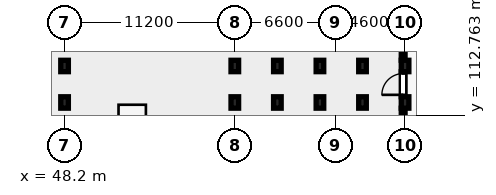
"""IFC4 building model, lengths in metres.
Left out: names, types, materials, properties, quantities, classifications, styles, units other than length and angle.
Written with IfcOpenShell. Run it as: python <this file> out.ifc"""

import sys

from ifc_helpers import new_model, si_unit, direction, frame, frame_2d, origin, origin_2d, place, context, subcontext, project, spatial, rectangle, extrude, element, fill, save


model = new_model("IFC4")
c1 = context("Model", 3, precision=1e-05, world=origin(), true_north=direction((0.0, 1.0)))
c2 = subcontext(c1, "Body", "Model", "MODEL_VIEW")
j1 = project(units=[si_unit("LENGTHUNIT", "METRE"), si_unit("PLANEANGLEUNIT", "RADIAN")], contexts=[c1])
p1 = place(None, origin())
s1 = spatial("IfcSite", under=j1, at=p1, CompositionType="ELEMENT")
p2 = place(p1, origin())
s2 = spatial("IfcBuilding", under=s1, at=p2, CompositionType="ELEMENT")
p3 = place(p2, origin())
s3 = spatial("IfcBuildingStorey", under=s2, at=p3, CompositionType="ELEMENT", Elevation=0.0)
for number, where, z_axis, x_axis in (
    (1, (48.2, 113.6, 0.0), (0.0, 0.0, 1.0), (1.0, 0.0, 0.0)),
    (2, (48.2, 116.0, 0.0), (0.0, 0.0, 1.0), (1.0, 0.0, 0.0)),
    (3, (59.4, 113.6, 0.0), (0.0, 0.0, 1.0), (1.0, 0.0, 0.0)),
    (4, (59.4, 116.0, 0.0), (0.0, 0.0, 1.0), (1.0, 0.0, 0.0)),
    (5, (62.2, 113.6, 0.0), (0.0, 0.0, 1.0), (1.0, 0.0, 0.0)),
    (6, (62.2, 116.0, 0.0), (0.0, 0.0, 1.0), (1.0, 0.0, 0.0)),
    (7, (65.0, 113.6, 0.0), (0.0, 0.0, 1.0), (1.0, 0.0, 0.0)),
    (8, (65.0, 116.0, 0.0), (0.0, 0.0, 1.0), (1.0, 0.0, 0.0)),
    (9, (67.8, 113.6, 0.0), (0.0, 0.0, 1.0), (1.0, 0.0, 0.0)),
    (10, (67.8, 116.0, 0.0), (0.0, 0.0, 1.0), (1.0, 0.0, 0.0)),
    (11, (70.6, 113.6, 0.0), (0.0, 0.0, 1.0), (1.0, 0.0, 0.0)),
    (12, (70.6, 116.0, 0.0), (0.0, 0.0, 1.0), (1.0, 0.0, 0.0)),
):
    element("IfcColumn", number, at=place(p3, frame(where, z_axis=z_axis, x_axis=x_axis)), inside=s3, PredefinedType="COLUMN", context=c2, shape_type="SweptSolid", body=[
        extrude(rectangle(XDim=0.5, YDim=0.75, at=origin_2d()), origin(), (0.0, 0.0, 1.0), 4.15),
    ])
p4 = place(p3, frame((53.7, 116.02, 0.0), z_axis=(0.0, 0.0, 1.0), x_axis=(1.0, 0.0, 0.0)))
e13 = element("IfcWall", 13, at=p4, inside=s3, PredefinedType="STANDARD", context=c2, shape_type="SweptSolid", body=[
    extrude(rectangle(XDim=5.65, YDim=0.2, at=frame_2d((2.825, 0.0))), origin(), (0.0, 0.0, 1.0), 3.492),
])
p5 = place(p4, frame((1.923, 0.0, 0.0)))
e14 = element("IfcOpeningElement", 14, at=p5, cuts=e13, PredefinedType="OPENING", context=c2, shape_type="SweptSolid", body=[
    extrude(rectangle(XDim=1.24, YDim=2.15, at=frame_2d((0.62, 1.075))), frame((0.0, 0.11, 0.0), z_axis=(0.0, -1.0, 0.0), x_axis=(1.0, 0.0, 0.0)), (0.0, 0.0, 1.0), 0.22),
])
p6 = place(p3, frame((48.45, 116.02, 0.0), z_axis=(0.0, 0.0, 1.0), x_axis=(1.0, 0.0, 0.0)))
e15 = element("IfcWall", 15, at=p6, inside=s3, PredefinedType="STANDARD", context=c2, shape_type="SweptSolid", body=[
    extrude(rectangle(XDim=5.25, YDim=0.2, at=frame_2d((2.625, 0.0))), origin(), (0.0, 0.0, 1.0), 3.492),
])
p7 = place(p6, frame((2.165, 0.0, 0.0)))
e16 = element("IfcOpeningElement", 16, at=p7, cuts=e15, PredefinedType="OPENING", context=c2, shape_type="SweptSolid", body=[
    extrude(rectangle(XDim=0.92, YDim=2.1, at=frame_2d((0.46, 1.05))), frame((0.0, 0.11, 0.0), z_axis=(0.0, -1.0, 0.0), x_axis=(1.0, 0.0, 0.0)), (0.0, 0.0, 1.0), 0.22),
])
p8 = place(p3, frame((53.7, 116.02, 0.0), z_axis=(0.0, 0.0, 1.0), x_axis=(0.0, 1.0, 0.0)))
e17 = element("IfcWall", 17, at=p8, inside=s3, PredefinedType="STANDARD", context=c2, shape_type="SweptSolid", body=[
    extrude(rectangle(XDim=2.93, YDim=0.2, at=frame_2d((1.465, 0.0))), origin(), (0.0, 0.0, 1.0), 3.492),
])
p9 = place(p3, frame((59.35, 116.02, 0.0), z_axis=(0.0, 0.0, 1.0), x_axis=(0.0, 1.0, 0.0)))
e18 = element("IfcWall", 18, at=p9, inside=s3, PredefinedType="STANDARD", context=c2, shape_type="SweptSolid", body=[
    extrude(rectangle(XDim=4.13, YDim=0.2, at=frame_2d((2.065, 0.0))), origin(), (0.0, 0.0, 1.0), 3.492),
])
p10 = place(p3, frame((51.65, 113.55, 0.0), z_axis=(0.0, 0.0, 1.0), x_axis=(1.0, 0.0, 0.0)))
e19 = element("IfcWall", 19, at=p10, inside=s3, PredefinedType="STANDARD", context=c2, shape_type="SweptSolid", body=[
    extrude(rectangle(XDim=2.0, YDim=0.2, at=frame_2d((1.0, 0.0))), origin(), (0.0, 0.0, 1.0), 3.492),
])
p11 = place(p3, frame((51.65, 110.85, 0.0), z_axis=(0.0, 0.0, 1.0), x_axis=(0.0, 1.0, 0.0)))
e20 = element("IfcWall", 20, at=p11, inside=s3, PredefinedType="STANDARD", context=c2, shape_type="SweptSolid", body=[
    extrude(rectangle(XDim=2.6, YDim=0.2, at=frame_2d((1.3, 0.0))), origin(), (0.0, 0.0, 1.0), 3.492),
])
p12 = place(p3, frame((53.65, 110.85, 0.0), z_axis=(0.0, 0.0, 1.0), x_axis=(0.0, 1.0, 0.0)))
e21 = element("IfcWall", 21, at=p12, inside=s3, PredefinedType="STANDARD", context=c2, shape_type="SweptSolid", body=[
    extrude(rectangle(XDim=2.6, YDim=0.2, at=frame_2d((1.3, 0.0))), origin(), (0.0, 0.0, 1.0), 3.492),
])
p13 = place(p12, frame((0.79, 0.0, 0.0)))
e22 = element("IfcOpeningElement", 22, at=p13, cuts=e21, PredefinedType="OPENING", context=c2, shape_type="SweptSolid", body=[
    extrude(rectangle(XDim=1.02, YDim=2.15, at=frame_2d((0.51, 1.075))), frame((0.0, 0.11, 0.0), z_axis=(0.0, -1.0, 0.0), x_axis=(1.0, 0.0, 0.0)), (0.0, 0.0, 1.0), 0.22),
])
p14 = place(p3, frame((53.75, 113.6, 0.0), z_axis=(0.0, 0.0, 1.0), x_axis=(1.0, 0.0, 0.0)))
e23 = element("IfcWall", 23, at=p14, inside=s3, PredefinedType="STANDARD", context=c2, shape_type="SweptSolid", body=[
    extrude(rectangle(XDim=5.6, YDim=0.2, at=frame_2d((2.8, 0.0))), origin(), (0.0, 0.0, 1.0), 3.492),
])
p15 = place(p14, frame((1.91, 0.0, 0.0)))
e24 = element("IfcOpeningElement", 24, at=p15, cuts=e23, PredefinedType="OPENING", context=c2, shape_type="SweptSolid", body=[
    extrude(rectangle(XDim=1.22, YDim=2.15, at=frame_2d((0.61, 1.075))), frame((0.0, 0.11, 0.0), z_axis=(0.0, -1.0, 0.0), x_axis=(1.0, 0.0, 0.0)), (0.0, 0.0, 1.0), 0.22),
])
p16 = place(p3, frame((59.4, 113.6, 0.0), z_axis=(0.0, 0.0, 1.0), x_axis=(1.0, 0.0, 0.0)))
e25 = element("IfcWall", 25, at=p16, inside=s3, PredefinedType="STANDARD", context=c2, shape_type="SweptSolid", body=[
    extrude(rectangle(XDim=2.8, YDim=0.2, at=frame_2d((1.4, 0.0))), origin(), (0.0, 0.0, 1.0), 3.492),
])
p17 = place(p16, frame((0.9, 0.0, 0.0)))
e26 = element("IfcOpeningElement", 26, at=p17, cuts=e25, PredefinedType="OPENING", context=c2, shape_type="SweptSolid", body=[
    extrude(rectangle(XDim=1.0, YDim=2.15, at=frame_2d((0.5, 1.075))), frame((0.0, 0.11, 0.0), z_axis=(0.0, -1.0, 0.0), x_axis=(1.0, 0.0, 0.0)), (0.0, 0.0, 1.0), 0.22),
])
p18 = place(p3, frame((59.4, 116.0, 0.0), z_axis=(0.0, 0.0, 1.0), x_axis=(1.0, 0.0, 0.0)))
e27 = element("IfcWall", 27, at=p18, inside=s3, PredefinedType="STANDARD", context=c2, shape_type="SweptSolid", body=[
    extrude(rectangle(XDim=2.8, YDim=0.2, at=frame_2d((1.4, 0.0))), origin(), (0.0, 0.0, 1.0), 3.492),
])
p19 = place(p18, frame((0.9, 0.0, 0.0)))
e28 = element("IfcOpeningElement", 28, at=p19, cuts=e27, PredefinedType="OPENING", context=c2, shape_type="SweptSolid", body=[
    extrude(rectangle(XDim=1.0, YDim=2.15, at=frame_2d((0.5, 1.075))), frame((0.0, 0.11, 0.0), z_axis=(0.0, -1.0, 0.0), x_axis=(1.0, 0.0, 0.0)), (0.0, 0.0, 1.0), 0.22),
])
for number, where, z_axis, x_axis in (
    (29, (62.2, 113.6, 0.0), (0.0, 0.0, 1.0), (1.0, 0.0, 0.0)),
    (30, (62.2, 116.0, 0.0), (0.0, 0.0, 1.0), (1.0, 0.0, 0.0)),
):
    element("IfcWall", number, at=place(p3, frame(where, z_axis=z_axis, x_axis=x_axis)), inside=s3, PredefinedType="STANDARD", context=c2, shape_type="SweptSolid", body=[
        extrude(rectangle(XDim=2.8, YDim=0.2, at=frame_2d((1.4, 0.0))), origin(), (0.0, 0.0, 1.0), 3.492),
    ])
p20 = place(p3, frame((65.0, 113.6, 0.0), z_axis=(0.0, 0.0, 1.0), x_axis=(1.0, 0.0, 0.0)))
e31 = element("IfcWall", 31, at=p20, inside=s3, PredefinedType="STANDARD", context=c2, shape_type="SweptSolid", body=[
    extrude(rectangle(XDim=2.8, YDim=0.2, at=frame_2d((1.4, 0.0))), origin(), (0.0, 0.0, 1.0), 3.492),
])
p21 = place(p20, frame((0.9, 0.0, 0.0)))
e32 = element("IfcOpeningElement", 32, at=p21, cuts=e31, PredefinedType="OPENING", context=c2, shape_type="SweptSolid", body=[
    extrude(rectangle(XDim=1.0, YDim=2.15, at=frame_2d((0.5, 1.075))), frame((0.0, 0.11, 0.0), z_axis=(0.0, -1.0, 0.0), x_axis=(1.0, 0.0, 0.0)), (0.0, 0.0, 1.0), 0.22),
])
p22 = place(p3, frame((65.0, 116.0, 0.0), z_axis=(0.0, 0.0, 1.0), x_axis=(1.0, 0.0, 0.0)))
e33 = element("IfcWall", 33, at=p22, inside=s3, PredefinedType="STANDARD", context=c2, shape_type="SweptSolid", body=[
    extrude(rectangle(XDim=2.8, YDim=0.2, at=frame_2d((1.4, 0.0))), origin(), (0.0, 0.0, 1.0), 3.492),
])
p23 = place(p22, frame((0.9, 0.0, 0.0)))
e34 = element("IfcOpeningElement", 34, at=p23, cuts=e33, PredefinedType="OPENING", context=c2, shape_type="SweptSolid", body=[
    extrude(rectangle(XDim=1.0, YDim=2.15, at=frame_2d((0.5, 1.075))), frame((0.0, 0.11, 0.0), z_axis=(0.0, -1.0, 0.0), x_axis=(1.0, 0.0, 0.0)), (0.0, 0.0, 1.0), 0.22),
])
for number, where, z_axis, x_axis in (
    (35, (67.8, 113.6, 0.0), (0.0, 0.0, 1.0), (1.0, 0.0, 0.0)),
    (36, (67.8, 116.0, 0.0), (0.0, 0.0, 1.0), (1.0, 0.0, 0.0)),
):
    element("IfcWall", number, at=place(p3, frame(where, z_axis=z_axis, x_axis=x_axis)), inside=s3, PredefinedType="STANDARD", context=c2, shape_type="SweptSolid", body=[
        extrude(rectangle(XDim=2.8, YDim=0.2, at=frame_2d((1.4, 0.0))), origin(), (0.0, 0.0, 1.0), 3.492),
    ])
p24 = place(p3, frame((62.2, 106.8, 0.0), z_axis=(0.0, 0.0, 1.0), x_axis=(0.0, 1.0, 0.0)))
e37 = element("IfcWall", 37, at=p24, inside=s3, PredefinedType="PARTITIONING", context=c2, shape_type="SweptSolid", body=[
    extrude(rectangle(XDim=6.75, YDim=0.15, at=frame_2d((3.375, 0.0))), origin(), (0.0, 0.0, 1.0), 3.492),
])
p25 = place(p24, frame((2.925, 0.0, 0.0)))
e38 = element("IfcOpeningElement", 38, at=p25, cuts=e37, PredefinedType="OPENING", context=c2, shape_type="SweptSolid", body=[
    extrude(rectangle(XDim=0.9, YDim=2.1, at=frame_2d((0.45, 1.05))), frame((0.0, 0.085, 0.0), z_axis=(0.0, -1.0, 0.0), x_axis=(1.0, 0.0, 0.0)), (0.0, 0.0, 1.0), 0.17),
])
p26 = place(p3, frame((62.2, 116.05, 0.0), z_axis=(0.0, 0.0, 1.0), x_axis=(0.0, 1.0, 0.0)))
e39 = element("IfcWall", 39, at=p26, inside=s3, PredefinedType="PARTITIONING", context=c2, shape_type="SweptSolid", body=[
    extrude(rectangle(XDim=6.53, YDim=0.15, at=frame_2d((3.265, 0.0))), origin(), (0.0, 0.0, 1.0), 3.492),
])
p27 = place(p26, frame((2.815, 0.0, 0.0)))
e40 = element("IfcOpeningElement", 40, at=p27, cuts=e39, PredefinedType="OPENING", context=c2, shape_type="SweptSolid", body=[
    extrude(rectangle(XDim=0.9, YDim=2.1, at=frame_2d((0.45, 1.05))), frame((0.0, 0.085, 0.0), z_axis=(0.0, -1.0, 0.0), x_axis=(1.0, 0.0, 0.0)), (0.0, 0.0, 1.0), 0.17),
])
p28 = place(p3, frame((65.0, 106.8, 0.0), z_axis=(0.0, 0.0, 1.0), x_axis=(0.0, 1.0, 0.0)))
e41 = element("IfcWall", 41, at=p28, inside=s3, PredefinedType="STANDARD", context=c2, shape_type="SweptSolid", body=[
    extrude(rectangle(XDim=6.75, YDim=0.22, at=frame_2d((3.375, 0.0))), origin(), (0.0, 0.0, 1.0), 3.492),
])
p29 = place(p3, frame((65.0, 116.05, 0.0), z_axis=(0.0, 0.0, 1.0), x_axis=(0.0, 1.0, 0.0)))
e42 = element("IfcWall", 42, at=p29, inside=s3, PredefinedType="STANDARD", context=c2, shape_type="SweptSolid", body=[
    extrude(rectangle(XDim=6.53, YDim=0.22, at=frame_2d((3.265, 0.0))), origin(), (0.0, 0.0, 1.0), 3.492),
])
p30 = place(p3, frame((67.8, 106.8, 0.0), z_axis=(0.0, 0.0, 1.0), x_axis=(0.0, 1.0, 0.0)))
e43 = element("IfcWall", 43, at=p30, inside=s3, PredefinedType="PARTITIONING", context=c2, shape_type="SweptSolid", body=[
    extrude(rectangle(XDim=6.75, YDim=0.15, at=frame_2d((3.375, 0.0))), origin(), (0.0, 0.0, 1.0), 3.492),
])
p31 = place(p30, frame((2.925, 0.0, 0.0)))
e44 = element("IfcOpeningElement", 44, at=p31, cuts=e43, PredefinedType="OPENING", context=c2, shape_type="SweptSolid", body=[
    extrude(rectangle(XDim=0.9, YDim=2.1, at=frame_2d((0.45, 1.05))), frame((0.0, 0.085, 0.0), z_axis=(0.0, -1.0, 0.0), x_axis=(1.0, 0.0, 0.0)), (0.0, 0.0, 1.0), 0.17),
])
p32 = place(p3, frame((67.8, 116.05, 0.0), z_axis=(0.0, 0.0, 1.0), x_axis=(0.0, 1.0, 0.0)))
e45 = element("IfcWall", 45, at=p32, inside=s3, PredefinedType="PARTITIONING", context=c2, shape_type="SweptSolid", body=[
    extrude(rectangle(XDim=6.53, YDim=0.15, at=frame_2d((3.265, 0.0))), origin(), (0.0, 0.0, 1.0), 3.492),
])
p33 = place(p32, frame((2.815, 0.0, 0.0)))
e46 = element("IfcOpeningElement", 46, at=p33, cuts=e45, PredefinedType="OPENING", context=c2, shape_type="SweptSolid", body=[
    extrude(rectangle(XDim=0.9, YDim=2.1, at=frame_2d((0.45, 1.05))), frame((0.0, 0.085, 0.0), z_axis=(0.0, -1.0, 0.0), x_axis=(1.0, 0.0, 0.0)), (0.0, 0.0, 1.0), 0.17),
])
p34 = place(p3, frame((48.2, 113.6, 0.0), z_axis=(0.0, 0.0, 1.0), x_axis=(-0.996191949488, -0.087187153726, 0.0)))
e47 = element("IfcWall", 47, at=p34, inside=s3, PredefinedType="STANDARD", context=c2, shape_type="SweptSolid", body=[
    extrude(rectangle(XDim=4.497, YDim=0.2, at=frame_2d((2.249, 0.0))), origin(), (0.0, 0.0, 1.0), 3.492),
])
p35 = place(p34, frame((1.729, 0.0, 0.0)))
e48 = element("IfcOpeningElement", 48, at=p35, cuts=e47, PredefinedType="OPENING", context=c2, shape_type="SweptSolid", body=[
    extrude(rectangle(XDim=1.04, YDim=2.15, at=frame_2d((0.52, 1.075))), frame((0.0, 0.11, 0.0), z_axis=(0.0, -1.0, 0.0), x_axis=(1.0, 0.0, 0.0)), (0.0, 0.0, 1.0), 0.22),
])
p36 = place(p3, frame((48.2, 116.0, 0.0), z_axis=(0.0, 0.0, 1.0), x_axis=(-0.996193663584, -0.087167566415, 0.0)))
e49 = element("IfcWall", 49, at=p36, inside=s3, PredefinedType="STANDARD", context=c2, shape_type="SweptSolid", body=[
    extrude(rectangle(XDim=4.916, YDim=0.2, at=frame_2d((2.458, 0.0))), origin(), (0.0, 0.0, 1.0), 3.492),
])
p37 = place(p36, frame((1.918, 0.0, 0.0)))
e50 = element("IfcOpeningElement", 50, at=p37, cuts=e49, PredefinedType="OPENING", context=c2, shape_type="SweptSolid", body=[
    extrude(rectangle(XDim=1.08, YDim=2.15, at=frame_2d((0.54, 1.075))), frame((0.0, 0.11, 0.0), z_axis=(0.0, -1.0, 0.0), x_axis=(1.0, 0.0, 0.0)), (0.0, 0.0, 1.0), 0.22),
])
p38 = place(p3, frame((48.2, 110.35, 0.0), z_axis=(0.0, 0.0, 1.0), x_axis=(0.0, 1.0, 0.0)))
e51 = element("IfcWall", 51, at=p38, inside=s3, PredefinedType="STANDARD", context=c2, shape_type="SweptSolid", body=[
    extrude(rectangle(XDim=3.2, YDim=0.22, at=frame_2d((1.6, 0.0))), origin(), (0.0, 0.0, 1.0), 3.492),
])
p39 = place(p3, frame((70.475, 107.02, 0.0), z_axis=(0.0, 0.0, 1.0), x_axis=(0.0, 1.0, 0.0)))
e52 = element("IfcWall", 52, at=p39, inside=s3, PredefinedType="STANDARD", context=c2, shape_type="SweptSolid", body=[
    extrude(rectangle(XDim=6.201, YDim=0.25, at=frame_2d((3.101, 0.0))), origin(), (0.0, 0.0, 1.0), 3.492),
])
p40 = place(p39, frame((2.33, 0.0, 0.88)))
e53 = element("IfcOpeningElement", 53, at=p40, cuts=e52, PredefinedType="OPENING", context=c2, shape_type="SweptSolid", body=[
    extrude(rectangle(XDim=1.5, YDim=1.65, at=frame_2d((0.75, 0.825))), frame((0.0, 0.135, 0.0), z_axis=(0.0, -1.0, 0.0), x_axis=(1.0, 0.0, 0.0)), (0.0, 0.0, 1.0), 0.27),
])
p41 = place(p3, frame((70.475, 113.979, 0.0), z_axis=(0.0, 0.0, 1.0), x_axis=(0.0, 1.0, 0.0)))
e54 = element("IfcWall", 54, at=p41, inside=s3, PredefinedType="STANDARD", context=c2, shape_type="SweptSolid", body=[
    extrude(rectangle(XDim=1.643, YDim=0.25, at=frame_2d((0.822, 0.0))), origin(), (0.0, 0.0, 1.0), 3.492),
])
p42 = place(p41, frame((0.123, 0.0, 0.0)))
e55 = element("IfcOpeningElement", 55, at=p42, cuts=e54, PredefinedType="OPENING", context=c2, shape_type="SweptSolid", body=[
    extrude(rectangle(XDim=1.4, YDim=2.15, at=frame_2d((0.7, 1.075))), frame((0.0, 0.135, 0.0), z_axis=(0.0, -1.0, 0.0), x_axis=(1.0, 0.0, 0.0)), (0.0, 0.0, 1.0), 0.27),
])
p43 = place(p3, frame((70.475, 116.378, 0.0), z_axis=(0.0, 0.0, 1.0), x_axis=(0.0, 1.0, 0.0)))
e56 = element("IfcWall", 56, at=p43, inside=s3, PredefinedType="STANDARD", context=c2, shape_type="SweptSolid", body=[
    extrude(rectangle(XDim=5.802, YDim=0.25, at=frame_2d((2.901, 0.0))), origin(), (0.0, 0.0, 1.0), 3.492),
])
p44 = place(p43, frame((2.171, 0.0, 0.88)))
e57 = element("IfcOpeningElement", 57, at=p44, cuts=e56, PredefinedType="OPENING", context=c2, shape_type="SweptSolid", body=[
    extrude(rectangle(XDim=1.5, YDim=1.65, at=frame_2d((0.75, 0.825))), frame((0.0, 0.135, 0.0), z_axis=(0.0, -1.0, 0.0), x_axis=(1.0, 0.0, 0.0)), (0.0, 0.0, 1.0), 0.27),
])
p45 = place(p5, origin())
e58 = element("IfcDoor", 58, at=p45, inside=s3, OperationType="SINGLE_SWING_LEFT", PredefinedType="DOOR", context=c2, shape_type="SweptSolid", body=[
    extrude(rectangle(XDim=1.24, YDim=2.15, at=frame_2d((0.62, 1.075))), frame((0.0, 0.025, 0.0), z_axis=(0.0, -1.0, 0.0), x_axis=(1.0, 0.0, 0.0)), (0.0, 0.0, 1.0), 0.05),
])
fill(e14, e58)
p46 = place(p7, frame((0.92, 0.0, 0.0), z_axis=(0.0, 0.0, 1.0), x_axis=(-1.0, 0.0, 0.0)))
e59 = element("IfcDoor", 59, at=p46, inside=s3, OperationType="SINGLE_SWING_RIGHT", PredefinedType="DOOR", context=c2, shape_type="SweptSolid", body=[
    extrude(rectangle(XDim=0.92, YDim=2.1, at=frame_2d((0.46, 1.05))), frame((0.0, 0.025, 0.0), z_axis=(0.0, -1.0, 0.0), x_axis=(1.0, 0.0, 0.0)), (0.0, 0.0, 1.0), 0.05),
])
fill(e16, e59)
p47 = place(p15, origin())
e60 = element("IfcDoor", 60, at=p47, inside=s3, OperationType="SINGLE_SWING_LEFT", PredefinedType="DOOR", context=c2, shape_type="SweptSolid", body=[
    extrude(rectangle(XDim=1.22, YDim=2.15, at=frame_2d((0.61, 1.075))), frame((0.0, 0.025, 0.0), z_axis=(0.0, -1.0, 0.0), x_axis=(1.0, 0.0, 0.0)), (0.0, 0.0, 1.0), 0.05),
])
fill(e24, e60)
p48 = place(p17, origin())
e61 = element("IfcDoor", 61, at=p48, inside=s3, OperationType="SINGLE_SWING_LEFT", PredefinedType="DOOR", context=c2, shape_type="SweptSolid", body=[
    extrude(rectangle(XDim=1.0, YDim=2.15, at=frame_2d((0.5, 1.075))), frame((0.0, 0.025, 0.0), z_axis=(0.0, -1.0, 0.0), x_axis=(1.0, 0.0, 0.0)), (0.0, 0.0, 1.0), 0.05),
])
fill(e26, e61)
p49 = place(p19, origin())
e62 = element("IfcDoor", 62, at=p49, inside=s3, OperationType="SINGLE_SWING_LEFT", PredefinedType="DOOR", context=c2, shape_type="SweptSolid", body=[
    extrude(rectangle(XDim=1.0, YDim=2.15, at=frame_2d((0.5, 1.075))), frame((0.0, 0.025, 0.0), z_axis=(0.0, -1.0, 0.0), x_axis=(1.0, 0.0, 0.0)), (0.0, 0.0, 1.0), 0.05),
])
fill(e28, e62)
p50 = place(p21, origin())
e63 = element("IfcDoor", 63, at=p50, inside=s3, OperationType="SINGLE_SWING_LEFT", PredefinedType="DOOR", context=c2, shape_type="SweptSolid", body=[
    extrude(rectangle(XDim=1.0, YDim=2.15, at=frame_2d((0.5, 1.075))), frame((0.0, 0.025, 0.0), z_axis=(0.0, -1.0, 0.0), x_axis=(1.0, 0.0, 0.0)), (0.0, 0.0, 1.0), 0.05),
])
fill(e32, e63)
p51 = place(p23, origin())
e64 = element("IfcDoor", 64, at=p51, inside=s3, OperationType="SINGLE_SWING_LEFT", PredefinedType="DOOR", context=c2, shape_type="SweptSolid", body=[
    extrude(rectangle(XDim=1.0, YDim=2.15, at=frame_2d((0.5, 1.075))), frame((0.0, 0.025, 0.0), z_axis=(0.0, -1.0, 0.0), x_axis=(1.0, 0.0, 0.0)), (0.0, 0.0, 1.0), 0.05),
])
fill(e34, e64)
p52 = place(p42, frame((1.4, 0.0, 0.0), z_axis=(0.0, 0.0, 1.0), x_axis=(-1.0, 0.0, 0.0)))
e65 = element("IfcDoor", 65, at=p52, inside=s3, OperationType="SINGLE_SWING_RIGHT", PredefinedType="DOOR", context=c2, shape_type="SweptSolid", body=[
    extrude(rectangle(XDim=1.4, YDim=2.15, at=frame_2d((0.7, 1.075))), frame((0.0, 0.025, 0.0), z_axis=(0.0, -1.0, 0.0), x_axis=(1.0, 0.0, 0.0)), (0.0, 0.0, 1.0), 0.05),
])
fill(e55, e65)
save(model, sys.argv[1])
